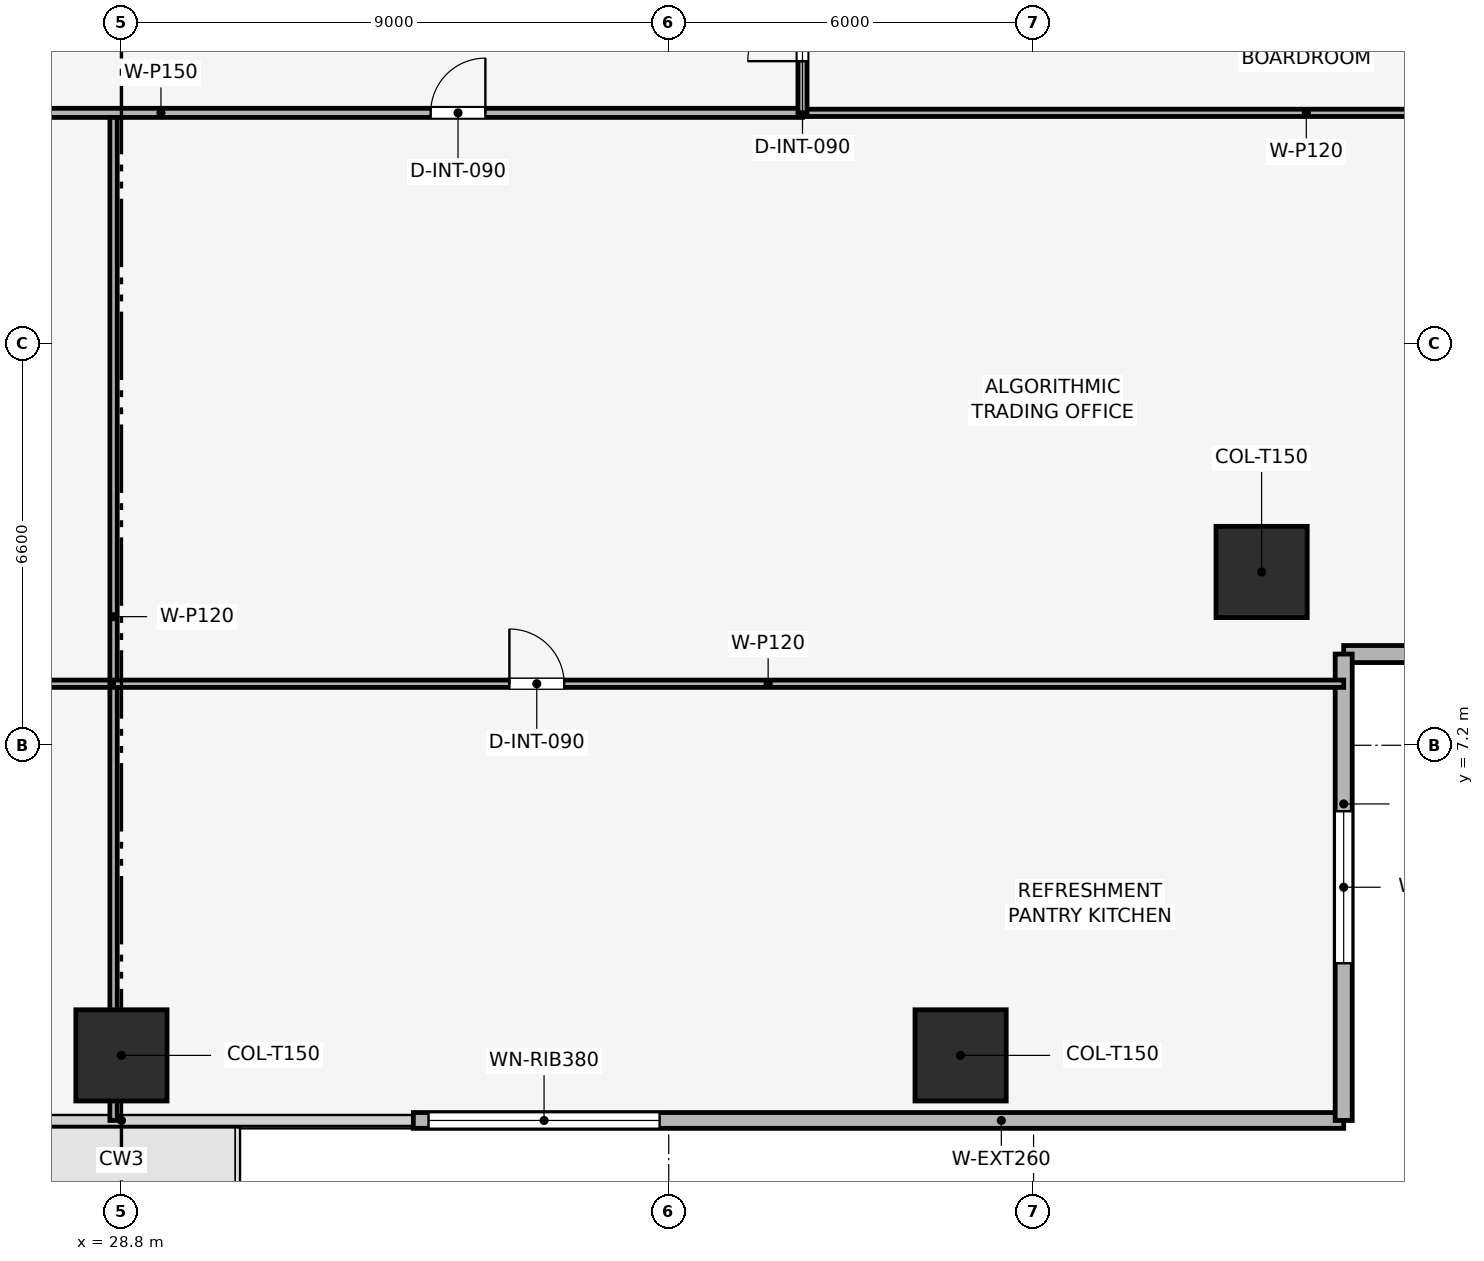
"""IFC4 building model, lengths in metres.
Left out: names, types, materials, properties, quantities, classifications, styles, units other than length and angle.
Written with IfcOpenShell. Run it as: python <this file> out.ifc"""

import sys

from ifc_helpers import new_model, si_unit, direction, frame, frame_2d, origin, origin_2d, place, context, subcontext, project, spatial, rectangle, extrude, element, fill, save


model = new_model("IFC4")
c1 = context("Model", 3, precision=1e-05, world=origin(), true_north=direction((0.0, 1.0)))
c2 = subcontext(c1, "Body", "Model", "MODEL_VIEW")
j1 = project(units=[si_unit("LENGTHUNIT", "METRE"), si_unit("PLANEANGLEUNIT", "RADIAN")], contexts=[c1])
p1 = place(None, origin())
s1 = spatial("IfcSite", under=j1, at=p1, CompositionType="ELEMENT")
p2 = place(p1, origin())
s2 = spatial("IfcBuilding", under=s1, at=p2, CompositionType="ELEMENT")
p3 = place(p2, frame((0.0, 0.0, 88.5)))
s3 = spatial("IfcBuildingStorey", under=s2, at=p3, CompositionType="ELEMENT", Elevation=88.5)
for number, where, z_axis, x_axis in (
    (1, (28.8, 2.1, 0.003), (0.0, 0.0, 1.0), (1.0, 0.0, 0.0)),
    (2, (42.6, 2.1, 0.003), (0.0, 0.0, 1.0), (1.0, 0.0, 0.0)),
    (3, (47.55, 10.05, 0.003), (0.0, 0.0, 1.0), (1.0, 0.0, 0.0)),
):
    element("IfcColumn", number, at=place(p3, frame(where, z_axis=z_axis, x_axis=x_axis)), inside=s3, PredefinedType="COLUMN", context=c2, shape_type="SweptSolid", body=[
        extrude(rectangle(XDim=1.5, YDim=1.5, at=origin_2d()), origin(), (0.0, 0.0, 1.0), 3.644),
    ])
p4 = place(p3, frame((48.9, 1.03, 0.0), z_axis=(0.0, 0.0, 1.0), x_axis=(-1.0, 0.0, 0.0)))
e4 = element("IfcWall", 4, at=p4, inside=s3, PredefinedType="SOLIDWALL", context=c2, shape_type="SweptSolid", body=[
    extrude(rectangle(XDim=15.3, YDim=0.26, at=frame_2d((7.65, 0.0))), origin(), (0.0, 0.0, 1.0), 3.65),
])
p5 = place(p4, frame((11.25, 0.0, 0.9)))
e5 = element("IfcOpeningElement", 5, at=p5, cuts=e4, PredefinedType="OPENING", context=c2, shape_type="SweptSolid", body=[
    extrude(rectangle(XDim=3.8, YDim=1.9, at=frame_2d((1.9, 0.95))), frame((0.0, 0.14, 0.0), z_axis=(0.0, -1.0, 0.0), x_axis=(1.0, 0.0, 0.0)), (0.0, 0.0, 1.0), 0.28),
])
p6 = place(p3, frame((56.57, 8.7, 0.0), z_axis=(0.0, 0.0, 1.0), x_axis=(-1.0, 0.0, 0.0)))
e6 = element("IfcWall", 6, at=p6, inside=s3, PredefinedType="SOLIDWALL", context=c2, shape_type="SweptSolid", body=[
    extrude(rectangle(XDim=7.67, YDim=0.28, at=frame_2d((3.835, 0.0))), origin(), (0.0, 0.0, 1.0), 3.65),
])
p7 = place(p6, frame((2.585, 0.0, 0.9)))
e7 = element("IfcOpeningElement", 7, at=p7, cuts=e6, PredefinedType="OPENING", context=c2, shape_type="SweptSolid", body=[
    extrude(rectangle(XDim=2.5, YDim=1.9, at=frame_2d((1.25, 0.95))), frame((0.0, 0.15, 0.0), z_axis=(0.0, -1.0, 0.0), x_axis=(1.0, 0.0, 0.0)), (0.0, 0.0, 1.0), 0.3),
])
p8 = place(p3, frame((48.9, 8.7, 0.0), z_axis=(0.0, 0.0, 1.0), x_axis=(0.0, -1.0, 0.0)))
e8 = element("IfcWall", 8, at=p8, inside=s3, PredefinedType="SOLIDWALL", context=c2, shape_type="SweptSolid", body=[
    extrude(rectangle(XDim=7.67, YDim=0.28, at=frame_2d((3.835, 0.0))), origin(), (0.0, 0.0, 1.0), 3.65),
])
p9 = place(p8, frame((2.585, 0.0, 0.9)))
e9 = element("IfcOpeningElement", 9, at=p9, cuts=e8, PredefinedType="OPENING", context=c2, shape_type="SweptSolid", body=[
    extrude(rectangle(XDim=2.5, YDim=1.9, at=frame_2d((1.25, 0.95))), frame((0.0, 0.15, 0.0), z_axis=(0.0, -1.0, 0.0), x_axis=(1.0, 0.0, 0.0)), (0.0, 0.0, 1.0), 0.3),
])
p10 = place(p3, frame((19.939, 8.212, 0.0), z_axis=(0.0, 0.0, 1.0), x_axis=(1.0, 0.0, 0.0)))
e10 = element("IfcWall", 10, at=p10, inside=s3, PredefinedType="PARTITIONING", context=c2, shape_type="SweptSolid", body=[
    extrude(rectangle(XDim=8.731, YDim=0.12, at=frame_2d((4.365, 0.0))), origin(), (0.0, 0.0, 1.0), 3.085),
])
p11 = place(p10, frame((1.439, 0.0, 0.0)))
e11 = element("IfcOpeningElement", 11, at=p11, cuts=e10, PredefinedType="OPENING", context=c2, shape_type="SweptSolid", body=[
    extrude(rectangle(XDim=0.9, YDim=2.1, at=frame_2d((0.45, 1.05))), frame((0.0, 0.07, 0.0), z_axis=(0.0, -1.0, 0.0), x_axis=(1.0, 0.0, 0.0)), (0.0, 0.0, 1.0), 0.14),
])
p12 = place(p3, frame((28.67, 1.03, 0.0), z_axis=(0.0, 0.0, 1.0), x_axis=(0.0, 1.0, 0.0)))
e12 = element("IfcWall", 12, at=p12, inside=s3, PredefinedType="PARTITIONING", context=c2, shape_type="SweptSolid", body=[
    extrude(rectangle(XDim=16.57, YDim=0.12, at=frame_2d((8.285, 0.0))), origin(), (0.0, 0.0, 1.0), 3.085),
])
p13 = place(p3, frame((28.67, 8.212, 0.0), z_axis=(0.0, 0.0, 1.0), x_axis=(1.0, 0.0, 0.0)))
e13 = element("IfcWall", 13, at=p13, inside=s3, PredefinedType="PARTITIONING", context=c2, shape_type="SweptSolid", body=[
    extrude(rectangle(XDim=20.23, YDim=0.12, at=frame_2d((10.115, 0.0))), origin(), (0.0, 0.0, 1.0), 2.935),
])
p14 = place(p13, frame((6.51, 0.0, 0.0)))
e14 = element("IfcOpeningElement", 14, at=p14, cuts=e13, PredefinedType="OPENING", context=c2, shape_type="SweptSolid", body=[
    extrude(rectangle(XDim=0.9, YDim=2.1, at=frame_2d((0.45, 1.05))), frame((0.0, 0.07, 0.0), z_axis=(0.0, -1.0, 0.0), x_axis=(1.0, 0.0, 0.0)), (0.0, 0.0, 1.0), 0.14),
])
p15 = place(p3, frame((40.0, 17.6, 0.0), z_axis=(0.0, 0.0, 1.0), x_axis=(1.0, 0.0, 0.0)))
e15 = element("IfcWall", 15, at=p15, inside=s3, PredefinedType="PARTITIONING", context=c2, shape_type="SweptSolid", body=[
    extrude(rectangle(XDim=16.57, YDim=0.12, at=frame_2d((8.285, 0.0))), origin(), (0.0, 0.0, 1.0), 2.935),
])
p16 = place(p3, frame((17.6, 17.6, 0.0), z_axis=(0.0, 0.0, 1.0), x_axis=(1.0, 0.0, 0.0)))
e16 = element("IfcWall", 16, at=p16, inside=s3, PredefinedType="PARTITIONING", context=c2, shape_type="SweptSolid", body=[
    extrude(rectangle(XDim=22.4, YDim=0.15, at=frame_2d((11.2, 0.0))), origin(), (0.0, 0.0, 1.0), 3.085),
])
p17 = place(p16, frame((0.72, 0.0, 0.0)))
e17 = element("IfcOpeningElement", 17, at=p17, cuts=e16, PredefinedType="OPENING", context=c2, shape_type="SweptSolid", body=[
    extrude(rectangle(XDim=0.9, YDim=2.1, at=frame_2d((0.45, 1.05))), frame((0.0, 0.085, 0.0), z_axis=(0.0, -1.0, 0.0), x_axis=(1.0, 0.0, 0.0)), (0.0, 0.0, 1.0), 0.17),
])
p18 = place(p16, frame((6.255, 0.0, 0.0)))
e18 = element("IfcOpeningElement", 18, at=p18, cuts=e16, PredefinedType="OPENING", context=c2, shape_type="SweptSolid", body=[
    extrude(rectangle(XDim=0.9, YDim=2.1, at=frame_2d((0.45, 1.05))), frame((0.0, 0.085, 0.0), z_axis=(0.0, -1.0, 0.0), x_axis=(1.0, 0.0, 0.0)), (0.0, 0.0, 1.0), 0.17),
])
p19 = place(p16, frame((16.285, 0.0, 0.0)))
e19 = element("IfcOpeningElement", 19, at=p19, cuts=e16, PredefinedType="OPENING", context=c2, shape_type="SweptSolid", body=[
    extrude(rectangle(XDim=0.9, YDim=2.1, at=frame_2d((0.45, 1.05))), frame((0.0, 0.085, 0.0), z_axis=(0.0, -1.0, 0.0), x_axis=(1.0, 0.0, 0.0)), (0.0, 0.0, 1.0), 0.17),
])
p20 = place(p3, frame((40.0, 17.6, 0.0), z_axis=(0.0, 0.0, 1.0), x_axis=(0.0, 1.0, 0.0)))
e20 = element("IfcWall", 20, at=p20, inside=s3, PredefinedType="PARTITIONING", context=c2, shape_type="SweptSolid", body=[
    extrude(rectangle(XDim=22.4, YDim=0.15, at=frame_2d((11.2, 0.0))), origin(), (0.0, 0.0, 1.0), 3.085),
])
p21 = place(p20, frame((0.85, 0.0, 0.0)))
e21 = element("IfcOpeningElement", 21, at=p21, cuts=e20, PredefinedType="OPENING", context=c2, shape_type="SweptSolid", body=[
    extrude(rectangle(XDim=0.9, YDim=2.1, at=frame_2d((0.45, 1.05))), frame((0.0, 0.085, 0.0), z_axis=(0.0, -1.0, 0.0), x_axis=(1.0, 0.0, 0.0)), (0.0, 0.0, 1.0), 0.17),
])
p22 = place(p20, frame((3.55, 0.0, 0.0)))
e22 = element("IfcOpeningElement", 22, at=p22, cuts=e20, PredefinedType="OPENING", context=c2, shape_type="SweptSolid", body=[
    extrude(rectangle(XDim=0.9, YDim=2.1, at=frame_2d((0.45, 1.05))), frame((0.0, 0.085, 0.0), z_axis=(0.0, -1.0, 0.0), x_axis=(1.0, 0.0, 0.0)), (0.0, 0.0, 1.0), 0.17),
])
p23 = place(p20, frame((6.45, 0.0, 0.0)))
e23 = element("IfcOpeningElement", 23, at=p23, cuts=e20, PredefinedType="OPENING", context=c2, shape_type="SweptSolid", body=[
    extrude(rectangle(XDim=0.9, YDim=2.1, at=frame_2d((0.45, 1.05))), frame((0.0, 0.085, 0.0), z_axis=(0.0, -1.0, 0.0), x_axis=(1.0, 0.0, 0.0)), (0.0, 0.0, 1.0), 0.17),
])
p24 = place(p20, frame((9.2, 0.0, 0.0)))
e24 = element("IfcOpeningElement", 24, at=p24, cuts=e20, PredefinedType="OPENING", context=c2, shape_type="SweptSolid", body=[
    extrude(rectangle(XDim=0.95, YDim=2.1, at=frame_2d((0.475, 1.05))), frame((0.0, 0.085, 0.0), z_axis=(0.0, -1.0, 0.0), x_axis=(1.0, 0.0, 0.0)), (0.0, 0.0, 1.0), 0.17),
])
p25 = place(p20, frame((16.25, 0.0, 0.0)))
e25 = element("IfcOpeningElement", 25, at=p25, cuts=e20, PredefinedType="OPENING", context=c2, shape_type="SweptSolid", body=[
    extrude(rectangle(XDim=0.9, YDim=2.1, at=frame_2d((0.45, 1.05))), frame((0.0, 0.085, 0.0), z_axis=(0.0, -1.0, 0.0), x_axis=(1.0, 0.0, 0.0)), (0.0, 0.0, 1.0), 0.17),
])
p26 = place(p5, origin())
e26 = element("IfcWindow", 26, at=p26, inside=s3, PartitioningType="SINGLE_PANEL", PredefinedType="WINDOW", context=c2, shape_type="SweptSolid", body=[
    extrude(rectangle(XDim=3.8, YDim=1.9, at=frame_2d((1.9, 0.95))), frame((0.0, 0.03, 0.0), z_axis=(0.0, -1.0, 0.0), x_axis=(1.0, 0.0, 0.0)), (0.0, 0.0, 1.0), 0.06),
])
fill(e5, e26)
p27 = place(p9, origin())
e27 = element("IfcWindow", 27, at=p27, inside=s3, PartitioningType="SINGLE_PANEL", PredefinedType="WINDOW", context=c2, shape_type="SweptSolid", body=[
    extrude(rectangle(XDim=2.5, YDim=1.9, at=frame_2d((1.25, 0.95))), frame((0.0, 0.03, 0.0), z_axis=(0.0, -1.0, 0.0), x_axis=(1.0, 0.0, 0.0)), (0.0, 0.0, 1.0), 0.06),
])
fill(e9, e27)
p28 = place(p14, origin())
e28 = element("IfcDoor", 28, at=p28, inside=s3, OperationType="SINGLE_SWING_LEFT", PredefinedType="DOOR", context=c2, shape_type="SweptSolid", body=[
    extrude(rectangle(XDim=0.9, YDim=2.1, at=frame_2d((0.45, 1.05))), frame((0.0, 0.025, 0.0), z_axis=(0.0, -1.0, 0.0), x_axis=(1.0, 0.0, 0.0)), (0.0, 0.0, 1.0), 0.05),
])
fill(e14, e28)
p29 = place(p19, origin())
e29 = element("IfcDoor", 29, at=p29, inside=s3, OperationType="SINGLE_SWING_RIGHT", PredefinedType="DOOR", context=c2, shape_type="SweptSolid", body=[
    extrude(rectangle(XDim=0.9, YDim=2.1, at=frame_2d((0.45, 1.05))), frame((0.0, 0.025, 0.0), z_axis=(0.0, -1.0, 0.0), x_axis=(1.0, 0.0, 0.0)), (0.0, 0.0, 1.0), 0.05),
])
fill(e19, e29)
p30 = place(p21, origin())
e30 = element("IfcDoor", 30, at=p30, inside=s3, OperationType="SINGLE_SWING_LEFT", PredefinedType="DOOR", context=c2, shape_type="SweptSolid", body=[
    extrude(rectangle(XDim=0.9, YDim=2.1, at=frame_2d((0.45, 1.05))), frame((0.0, 0.025, 0.0), z_axis=(0.0, -1.0, 0.0), x_axis=(1.0, 0.0, 0.0)), (0.0, 0.0, 1.0), 0.05),
])
fill(e21, e30)
save(model, sys.argv[1])
